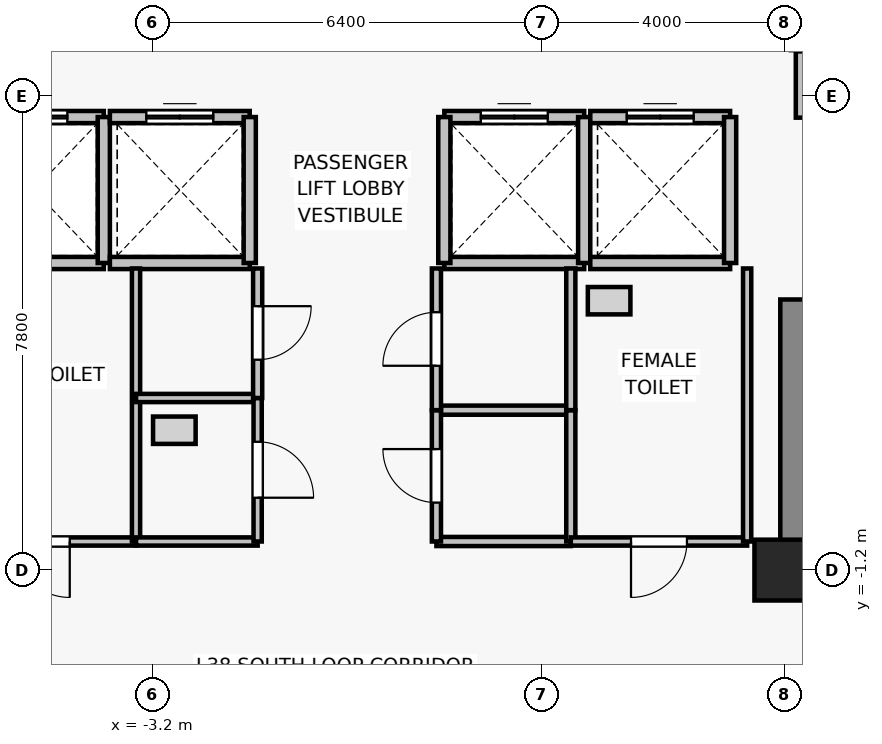
"""IFC4 building model, lengths in metres.
Left out: names, types, materials, properties, quantities, classifications, styles, units other than length and angle.
Written with IfcOpenShell. Run it as: python <this file> out.ifc"""

import sys

from ifc_helpers import new_model, si_unit, direction, frame, frame_2d, origin, origin_2d, place, context, subcontext, project, spatial, rectangle, extrude, source, transform, mapped, element, fill, save


model = new_model("IFC4")
c1 = context("Model", 3, precision=1e-05, world=origin(), true_north=direction((0.0, 1.0)))
c2 = subcontext(c1, "Body", "Model", "MODEL_VIEW")
j1 = project(units=[si_unit("LENGTHUNIT", "METRE"), si_unit("PLANEANGLEUNIT", "RADIAN")], contexts=[c1])
p1 = place(None, origin())
s1 = spatial("IfcSite", under=j1, at=p1, CompositionType="ELEMENT")
p2 = place(p1, origin())
s2 = spatial("IfcBuilding", under=s1, at=p2, CompositionType="ELEMENT")
p3 = place(p2, frame((0.0, 0.0, 136.3)))
s3 = spatial("IfcBuildingStorey", under=s2, at=p3, CompositionType="ELEMENT", Elevation=136.3)
p4 = place(p3, frame((7.2, -1.2, 0.0), z_axis=(0.0, 0.0, 1.0), x_axis=(1.0, 0.0, 0.0)))
e1 = element("IfcColumn", 1, at=p4, inside=s3, PredefinedType="COLUMN", context=c2, shape_type="SweptSolid", body=[
    extrude(rectangle(XDim=1.0, YDim=1.0, at=origin_2d()), origin(), (0.0, 0.0, 1.0), 3.3),
])
p5 = place(p3, frame((7.4, -0.825, 0.0), z_axis=(0.0, 0.0, 1.0), x_axis=(0.0, 1.0, 0.0)))
e2 = element("IfcWall", 2, at=p5, inside=s3, PredefinedType="SHEAR", context=c2, shape_type="SweptSolid", body=[
    extrude(rectangle(XDim=4.075, YDim=0.55, at=frame_2d((2.038, 0.0))), origin(), (0.0, 0.0, 1.0), 3.05),
])
p6 = place(p3, frame((-4.0, 3.85, 0.0), z_axis=(0.0, 0.0, 1.0), x_axis=(-1.0, 0.0, 0.0)))
e3 = element("IfcWall", 3, at=p6, inside=s3, PredefinedType="SOLIDWALL", context=c2, shape_type="SweptSolid", body=[
    extrude(rectangle(XDim=2.3, YDim=0.2, at=frame_2d((1.15, 0.0))), origin(), (0.0, 0.0, 1.0), 3.05),
])
p7 = place(p3, frame((-6.3, 6.25, 0.0), z_axis=(0.0, 0.0, 1.0), x_axis=(1.0, 0.0, 0.0)))
e4 = element("IfcWall", 4, at=p7, inside=s3, PredefinedType="SOLIDWALL", context=c2, shape_type="SweptSolid", body=[
    extrude(rectangle(XDim=2.3, YDim=0.2, at=frame_2d((1.15, 0.0))), origin(), (0.0, 0.0, 1.0), 3.05),
])
p8 = place(p7, frame((0.6, 0.0, 0.0)))
e5 = element("IfcOpeningElement", 5, at=p8, cuts=e4, PredefinedType="OPENING", context=c2, shape_type="SweptSolid", body=[
    extrude(rectangle(XDim=1.1, YDim=2.2, at=frame_2d((0.55, 1.1))), frame((0.0, 0.11, 0.0), z_axis=(0.0, -1.0, 0.0), x_axis=(1.0, 0.0, 0.0)), (0.0, 0.0, 1.0), 0.22),
])
p9 = place(p3, frame((-4.0, 6.25, 0.0), z_axis=(0.0, 0.0, 1.0), x_axis=(0.0, -1.0, 0.0)))
e6 = element("IfcWall", 6, at=p9, inside=s3, PredefinedType="SOLIDWALL", context=c2, shape_type="SweptSolid", body=[
    extrude(rectangle(XDim=2.4, YDim=0.2, at=frame_2d((1.2, 0.0))), origin(), (0.0, 0.0, 1.0), 3.05),
])
p10 = place(p3, frame((-1.6, 3.85, 0.0), z_axis=(0.0, 0.0, 1.0), x_axis=(-1.0, 0.0, 0.0)))
e7 = element("IfcWall", 7, at=p10, inside=s3, PredefinedType="SOLIDWALL", context=c2, shape_type="SweptSolid", body=[
    extrude(rectangle(XDim=2.3, YDim=0.2, at=frame_2d((1.15, 0.0))), origin(), (0.0, 0.0, 1.0), 3.05),
])
p11 = place(p3, frame((-3.9, 6.25, 0.0), z_axis=(0.0, 0.0, 1.0), x_axis=(1.0, 0.0, 0.0)))
e8 = element("IfcWall", 8, at=p11, inside=s3, PredefinedType="SOLIDWALL", context=c2, shape_type="SweptSolid", body=[
    extrude(rectangle(XDim=2.3, YDim=0.2, at=frame_2d((1.15, 0.0))), origin(), (0.0, 0.0, 1.0), 3.05),
])
p12 = place(p11, frame((0.6, 0.0, 0.0)))
e9 = element("IfcOpeningElement", 9, at=p12, cuts=e8, PredefinedType="OPENING", context=c2, shape_type="SweptSolid", body=[
    extrude(rectangle(XDim=1.1, YDim=2.2, at=frame_2d((0.55, 1.1))), frame((0.0, 0.11, 0.0), z_axis=(0.0, -1.0, 0.0), x_axis=(1.0, 0.0, 0.0)), (0.0, 0.0, 1.0), 0.22),
])
p13 = place(p3, frame((-1.6, 6.25, 0.0), z_axis=(0.0, 0.0, 1.0), x_axis=(0.0, -1.0, 0.0)))
e10 = element("IfcWall", 10, at=p13, inside=s3, PredefinedType="SOLIDWALL", context=c2, shape_type="SweptSolid", body=[
    extrude(rectangle(XDim=2.4, YDim=0.2, at=frame_2d((1.2, 0.0))), origin(), (0.0, 0.0, 1.0), 3.05),
])
p14 = place(p3, frame((3.9, 3.85, 0.0), z_axis=(0.0, 0.0, 1.0), x_axis=(-1.0, 0.0, 0.0)))
e11 = element("IfcWall", 11, at=p14, inside=s3, PredefinedType="SOLIDWALL", context=c2, shape_type="SweptSolid", body=[
    extrude(rectangle(XDim=2.3, YDim=0.2, at=frame_2d((1.15, 0.0))), origin(), (0.0, 0.0, 1.0), 3.05),
])
p15 = place(p3, frame((1.6, 6.25, 0.0), z_axis=(0.0, 0.0, 1.0), x_axis=(1.0, 0.0, 0.0)))
e12 = element("IfcWall", 12, at=p15, inside=s3, PredefinedType="SOLIDWALL", context=c2, shape_type="SweptSolid", body=[
    extrude(rectangle(XDim=2.3, YDim=0.2, at=frame_2d((1.15, 0.0))), origin(), (0.0, 0.0, 1.0), 3.05),
])
p16 = place(p15, frame((0.6, 0.0, 0.0)))
e13 = element("IfcOpeningElement", 13, at=p16, cuts=e12, PredefinedType="OPENING", context=c2, shape_type="SweptSolid", body=[
    extrude(rectangle(XDim=1.1, YDim=2.2, at=frame_2d((0.55, 1.1))), frame((0.0, 0.11, 0.0), z_axis=(0.0, -1.0, 0.0), x_axis=(1.0, 0.0, 0.0)), (0.0, 0.0, 1.0), 0.22),
])
for number, where, z_axis, x_axis in (
    (14, (1.6, 3.85, 0.0), (0.0, 0.0, 1.0), (0.0, 1.0, 0.0)),
    (15, (3.9, 6.25, 0.0), (0.0, 0.0, 1.0), (0.0, -1.0, 0.0)),
):
    element("IfcWall", number, at=place(p3, frame(where, z_axis=z_axis, x_axis=x_axis)), inside=s3, PredefinedType="SOLIDWALL", context=c2, shape_type="SweptSolid", body=[
        extrude(rectangle(XDim=2.4, YDim=0.2, at=frame_2d((1.2, 0.0))), origin(), (0.0, 0.0, 1.0), 3.05),
    ])
p17 = place(p3, frame((6.3, 3.85, 0.0), z_axis=(0.0, 0.0, 1.0), x_axis=(-1.0, 0.0, 0.0)))
e16 = element("IfcWall", 16, at=p17, inside=s3, PredefinedType="SOLIDWALL", context=c2, shape_type="SweptSolid", body=[
    extrude(rectangle(XDim=2.3, YDim=0.2, at=frame_2d((1.15, 0.0))), origin(), (0.0, 0.0, 1.0), 3.05),
])
p18 = place(p3, frame((4.0, 6.25, 0.0), z_axis=(0.0, 0.0, 1.0), x_axis=(1.0, 0.0, 0.0)))
e17 = element("IfcWall", 17, at=p18, inside=s3, PredefinedType="SOLIDWALL", context=c2, shape_type="SweptSolid", body=[
    extrude(rectangle(XDim=2.3, YDim=0.2, at=frame_2d((1.15, 0.0))), origin(), (0.0, 0.0, 1.0), 3.05),
])
p19 = place(p18, frame((0.6, 0.0, 0.0)))
e18 = element("IfcOpeningElement", 18, at=p19, cuts=e17, PredefinedType="OPENING", context=c2, shape_type="SweptSolid", body=[
    extrude(rectangle(XDim=1.1, YDim=2.2, at=frame_2d((0.55, 1.1))), frame((0.0, 0.11, 0.0), z_axis=(0.0, -1.0, 0.0), x_axis=(1.0, 0.0, 0.0)), (0.0, 0.0, 1.0), 0.22),
])
p20 = place(p3, frame((6.3, 6.25, 0.0), z_axis=(0.0, 0.0, 1.0), x_axis=(0.0, -1.0, 0.0)))
e19 = element("IfcWall", 19, at=p20, inside=s3, PredefinedType="SOLIDWALL", context=c2, shape_type="SweptSolid", body=[
    extrude(rectangle(XDim=2.4, YDim=0.2, at=frame_2d((1.2, 0.0))), origin(), (0.0, 0.0, 1.0), 3.05),
])
p21 = place(p3, frame((9.6, 7.35, 0.0), z_axis=(0.0, 0.0, 1.0), x_axis=(-1.0, 0.0, 0.0)))
e20 = element("IfcWall", 20, at=p21, inside=s3, PredefinedType="SOLIDWALL", context=c2, shape_type="SweptSolid", body=[
    extrude(rectangle(XDim=2.2, YDim=0.2, at=frame_2d((1.1, 0.0))), origin(), (0.0, 0.0, 1.0), 2.49),
])
p22 = place(p3, frame((7.47, 6.24, 0.0), z_axis=(0.0, 0.0, 1.0), x_axis=(0.0, 1.0, 0.0)))
e21 = element("IfcWall", 21, at=p22, inside=s3, PredefinedType="PARTITIONING", context=c2, shape_type="SweptSolid", body=[
    extrude(rectangle(XDim=1.09, YDim=0.18, at=frame_2d((0.545, 0.0))), origin(), (0.0, 0.0, 1.0), 2.49),
])
p23 = place(p3, frame((-3.47, -0.73, 0.0), z_axis=(0.0, 0.0, 1.0), x_axis=(-1.0, 0.0, 0.0)))
e22 = element("IfcWall", 22, at=p23, inside=s3, PredefinedType="PARTITIONING", context=c2, shape_type="SweptSolid", body=[
    extrude(rectangle(XDim=3.11, YDim=0.135, at=frame_2d((1.555, 0.0))), origin(), (0.0, 0.0, 1.0), 3.05),
])
p24 = place(p23, frame((1.09, 0.0, 0.0)))
e23 = element("IfcOpeningElement", 23, at=p24, cuts=e22, PredefinedType="OPENING", context=c2, shape_type="SweptSolid", body=[
    extrude(rectangle(XDim=0.92, YDim=2.1, at=frame_2d((0.46, 1.05))), frame((0.0, 0.077, 0.0), z_axis=(0.0, -1.0, 0.0), x_axis=(1.0, 0.0, 0.0)), (0.0, 0.0, 1.0), 0.155),
])
p25 = place(p3, frame((-3.47, 3.76, 0.0), z_axis=(0.0, 0.0, 1.0), x_axis=(0.0, -1.0, 0.0)))
e24 = element("IfcWall", 24, at=p25, inside=s3, PredefinedType="PARTITIONING", context=c2, shape_type="SweptSolid", body=[
    extrude(rectangle(XDim=4.49, YDim=0.135, at=frame_2d((2.245, 0.0))), origin(), (0.0, 0.0, 1.0), 3.05),
])
for number, where, z_axis, x_axis in (
    (25, (-1.47, -0.73, 0.0), (0.0, 0.0, 1.0), (-1.0, 0.0, 0.0)),
    (26, (-3.47, 1.63, 0.0), (0.0, 0.0, 1.0), (1.0, 0.0, 0.0)),
):
    element("IfcWall", number, at=place(p3, frame(where, z_axis=z_axis, x_axis=x_axis)), inside=s3, PredefinedType="PARTITIONING", context=c2, shape_type="SweptSolid", body=[
        extrude(rectangle(XDim=2.0, YDim=0.135, at=frame_2d((1.0, 0.0))), origin(), (0.0, 0.0, 1.0), 3.05),
    ])
p26 = place(p3, frame((-1.47, 1.63, 0.0), z_axis=(0.0, 0.0, 1.0), x_axis=(0.0, -1.0, 0.0)))
e27 = element("IfcWall", 27, at=p26, inside=s3, PredefinedType="PARTITIONING", context=c2, shape_type="SweptSolid", body=[
    extrude(rectangle(XDim=2.36, YDim=0.135, at=frame_2d((1.18, 0.0))), origin(), (0.0, 0.0, 1.0), 3.05),
])
p27 = place(p26, frame((0.72, 0.0, 0.0)))
e28 = element("IfcOpeningElement", 28, at=p27, cuts=e27, PredefinedType="OPENING", context=c2, shape_type="SweptSolid", body=[
    extrude(rectangle(XDim=0.92, YDim=2.1, at=frame_2d((0.46, 1.05))), frame((0.0, 0.077, 0.0), z_axis=(0.0, -1.0, 0.0), x_axis=(1.0, 0.0, 0.0)), (0.0, 0.0, 1.0), 0.155),
])
p28 = place(p3, frame((-1.47, 3.76, 0.0), z_axis=(0.0, 0.0, 1.0), x_axis=(0.0, -1.0, 0.0)))
e29 = element("IfcWall", 29, at=p28, inside=s3, PredefinedType="PARTITIONING", context=c2, shape_type="SweptSolid", body=[
    extrude(rectangle(XDim=2.13, YDim=0.15, at=frame_2d((1.065, 0.0))), origin(), (0.0, 0.0, 1.0), 3.05),
])
p29 = place(p28, frame((0.62, 0.0, 0.0)))
e30 = element("IfcOpeningElement", 30, at=p29, cuts=e29, PredefinedType="OPENING", context=c2, shape_type="SweptSolid", body=[
    extrude(rectangle(XDim=0.88, YDim=2.1, at=frame_2d((0.44, 1.05))), frame((0.0, 0.085, 0.0), z_axis=(0.0, -1.0, 0.0), x_axis=(1.0, 0.0, 0.0)), (0.0, 0.0, 1.0), 0.17),
])
for number, where, z_axis, x_axis in (
    (31, (3.68, -0.73, 0.0), (0.0, 0.0, 1.0), (-1.0, 0.0, 0.0)),
    (32, (1.47, 1.43, 0.0), (0.0, 0.0, 1.0), (1.0, 0.0, 0.0)),
):
    element("IfcWall", number, at=place(p3, frame(where, z_axis=z_axis, x_axis=x_axis)), inside=s3, PredefinedType="PARTITIONING", context=c2, shape_type="SweptSolid", body=[
        extrude(rectangle(XDim=2.21, YDim=0.15, at=frame_2d((1.105, 0.0))), origin(), (0.0, 0.0, 1.0), 3.05),
    ])
p30 = place(p3, frame((1.47, -0.73, 0.0), z_axis=(0.0, 0.0, 1.0), x_axis=(0.0, 1.0, 0.0)))
e33 = element("IfcWall", 33, at=p30, inside=s3, PredefinedType="PARTITIONING", context=c2, shape_type="SweptSolid", body=[
    extrude(rectangle(XDim=2.16, YDim=0.15, at=frame_2d((1.08, 0.0))), origin(), (0.0, 0.0, 1.0), 3.05),
])
p31 = place(p30, frame((0.64, 0.0, 0.0)))
e34 = element("IfcOpeningElement", 34, at=p31, cuts=e33, PredefinedType="OPENING", context=c2, shape_type="SweptSolid", body=[
    extrude(rectangle(XDim=0.88, YDim=2.1, at=frame_2d((0.44, 1.05))), frame((0.0, 0.085, 0.0), z_axis=(0.0, -1.0, 0.0), x_axis=(1.0, 0.0, 0.0)), (0.0, 0.0, 1.0), 0.17),
])
p32 = place(p3, frame((3.68, 1.43, 0.0), z_axis=(0.0, 0.0, 1.0), x_axis=(0.0, -1.0, 0.0)))
e35 = element("IfcWall", 35, at=p32, inside=s3, PredefinedType="PARTITIONING", context=c2, shape_type="SweptSolid", body=[
    extrude(rectangle(XDim=2.16, YDim=0.15, at=frame_2d((1.08, 0.0))), origin(), (0.0, 0.0, 1.0), 3.05),
])
p33 = place(p3, frame((1.47, 1.43, 0.0), z_axis=(0.0, 0.0, 1.0), x_axis=(0.0, 1.0, 0.0)))
e36 = element("IfcWall", 36, at=p33, inside=s3, PredefinedType="PARTITIONING", context=c2, shape_type="SweptSolid", body=[
    extrude(rectangle(XDim=2.33, YDim=0.15, at=frame_2d((1.165, 0.0))), origin(), (0.0, 0.0, 1.0), 3.05),
])
p34 = place(p33, frame((0.73, 0.0, 0.0)))
e37 = element("IfcOpeningElement", 37, at=p34, cuts=e36, PredefinedType="OPENING", context=c2, shape_type="SweptSolid", body=[
    extrude(rectangle(XDim=0.88, YDim=2.15, at=frame_2d((0.44, 1.075))), frame((0.0, 0.085, 0.0), z_axis=(0.0, -1.0, 0.0), x_axis=(1.0, 0.0, 0.0)), (0.0, 0.0, 1.0), 0.17),
])
p35 = place(p3, frame((3.68, 3.76, 0.0), z_axis=(0.0, 0.0, 1.0), x_axis=(0.0, -1.0, 0.0)))
e38 = element("IfcWall", 38, at=p35, inside=s3, PredefinedType="PARTITIONING", context=c2, shape_type="SweptSolid", body=[
    extrude(rectangle(XDim=2.33, YDim=0.15, at=frame_2d((1.165, 0.0))), origin(), (0.0, 0.0, 1.0), 3.05),
])
p36 = place(p3, frame((6.58, -0.73, 0.0), z_axis=(0.0, 0.0, 1.0), x_axis=(-1.0, 0.0, 0.0)))
e39 = element("IfcWall", 39, at=p36, inside=s3, PredefinedType="PARTITIONING", context=c2, shape_type="SweptSolid", body=[
    extrude(rectangle(XDim=2.9, YDim=0.135, at=frame_2d((1.45, 0.0))), origin(), (0.0, 0.0, 1.0), 3.05),
])
p37 = place(p36, frame((0.99, 0.0, 0.0)))
e40 = element("IfcOpeningElement", 40, at=p37, cuts=e39, PredefinedType="OPENING", context=c2, shape_type="SweptSolid", body=[
    extrude(rectangle(XDim=0.92, YDim=2.1, at=frame_2d((0.46, 1.05))), frame((0.0, 0.077, 0.0), z_axis=(0.0, -1.0, 0.0), x_axis=(1.0, 0.0, 0.0)), (0.0, 0.0, 1.0), 0.155),
])
p38 = place(p3, frame((6.58, 3.76, 0.0), z_axis=(0.0, 0.0, 1.0), x_axis=(0.0, -1.0, 0.0)))
e41 = element("IfcWall", 41, at=p38, inside=s3, PredefinedType="PARTITIONING", context=c2, shape_type="SweptSolid", body=[
    extrude(rectangle(XDim=4.49, YDim=0.135, at=frame_2d((2.245, 0.0))), origin(), (0.0, 0.0, 1.0), 3.05),
])
m1 = source(origin(), c2, "Body", "SweptSolid", [
    extrude(rectangle(XDim=1.1, YDim=2.2, at=frame_2d((0.55, 1.1))), frame((0.0, 0.025, 0.0), z_axis=(0.0, -1.0, 0.0), x_axis=(1.0, 0.0, 0.0)), (0.0, 0.0, 1.0), 0.05),
])
p39 = place(p8, origin())
e42 = element("IfcDoor", 42, at=p39, inside=s3, OperationType="DOUBLE_DOOR_SLIDING", PredefinedType="DOOR", context=c2, shape_type="MappedRepresentation", body=[
    mapped(m1, transform((0.0, 0.0, 0.0), x_axis=(1.0, 0.0, 0.0), y_axis=(0.0, 1.0, 0.0), z_axis=(0.0, 0.0, 1.0), scale=1.0)),
])
fill(e5, e42)
p40 = place(p12, origin())
e43 = element("IfcDoor", 43, at=p40, inside=s3, OperationType="DOUBLE_DOOR_SLIDING", PredefinedType="DOOR", context=c2, shape_type="MappedRepresentation", body=[
    mapped(m1, transform((0.0, 0.0, 0.0), x_axis=(1.0, 0.0, 0.0), y_axis=(0.0, 1.0, 0.0), z_axis=(0.0, 0.0, 1.0), scale=1.0)),
])
fill(e9, e43)
p41 = place(p16, origin())
e44 = element("IfcDoor", 44, at=p41, inside=s3, OperationType="DOUBLE_DOOR_SLIDING", PredefinedType="DOOR", context=c2, shape_type="MappedRepresentation", body=[
    mapped(m1, transform((0.0, 0.0, 0.0), x_axis=(1.0, 0.0, 0.0), y_axis=(0.0, 1.0, 0.0), z_axis=(0.0, 0.0, 1.0), scale=1.0)),
])
fill(e13, e44)
p42 = place(p19, origin())
e45 = element("IfcDoor", 45, at=p42, inside=s3, OperationType="DOUBLE_DOOR_SLIDING", PredefinedType="DOOR", context=c2, shape_type="MappedRepresentation", body=[
    mapped(m1, transform((0.0, 0.0, 0.0), x_axis=(1.0, 0.0, 0.0), y_axis=(0.0, 1.0, 0.0), z_axis=(0.0, 0.0, 1.0), scale=1.0)),
])
fill(e18, e45)
m2 = source(origin(), c2, "Body", "SweptSolid", [
    extrude(rectangle(XDim=0.92, YDim=2.1, at=frame_2d((0.46, 1.05))), frame((0.0, 0.025, 0.0), z_axis=(0.0, -1.0, 0.0), x_axis=(1.0, 0.0, 0.0)), (0.0, 0.0, 1.0), 0.05),
])
p43 = place(p24, origin())
e46 = element("IfcDoor", 46, at=p43, inside=s3, OperationType="SINGLE_SWING_LEFT", PredefinedType="DOOR", context=c2, shape_type="MappedRepresentation", body=[
    mapped(m2, transform((0.0, 0.0, 0.0), x_axis=(1.0, 0.0, 0.0), y_axis=(0.0, 1.0, 0.0), z_axis=(0.0, 0.0, 1.0), scale=1.0)),
])
fill(e23, e46)
p44 = place(p27, origin())
e47 = element("IfcDoor", 47, at=p44, inside=s3, OperationType="SINGLE_SWING_RIGHT", PredefinedType="DOOR", context=c2, shape_type="MappedRepresentation", body=[
    mapped(m2, transform((0.0, 0.0, 0.0), x_axis=(1.0, 0.0, 0.0), y_axis=(0.0, 1.0, 0.0), z_axis=(0.0, 0.0, 1.0), scale=1.0)),
])
fill(e28, e47)
m3 = source(origin(), c2, "Body", "SweptSolid", [
    extrude(rectangle(XDim=0.88, YDim=2.1, at=frame_2d((0.44, 1.05))), frame((0.0, 0.025, 0.0), z_axis=(0.0, -1.0, 0.0), x_axis=(1.0, 0.0, 0.0)), (0.0, 0.0, 1.0), 0.05),
])
p45 = place(p29, origin())
e48 = element("IfcDoor", 48, at=p45, inside=s3, OperationType="SINGLE_SWING_LEFT", PredefinedType="DOOR", context=c2, shape_type="MappedRepresentation", body=[
    mapped(m3, transform((0.0, 0.0, 0.0), x_axis=(1.0, 0.0, 0.0), y_axis=(0.0, 1.0, 0.0), z_axis=(0.0, 0.0, 1.0), scale=1.0)),
])
fill(e30, e48)
p46 = place(p31, origin())
e49 = element("IfcDoor", 49, at=p46, inside=s3, OperationType="SINGLE_SWING_RIGHT", PredefinedType="DOOR", context=c2, shape_type="MappedRepresentation", body=[
    mapped(m3, transform((0.0, 0.0, 0.0), x_axis=(1.0, 0.0, 0.0), y_axis=(0.0, 1.0, 0.0), z_axis=(0.0, 0.0, 1.0), scale=1.0)),
])
fill(e34, e49)
m4 = source(origin(), c2, "Body", "SweptSolid", [
    extrude(rectangle(XDim=0.88, YDim=2.15, at=frame_2d((0.44, 1.075))), frame((0.0, 0.025, 0.0), z_axis=(0.0, -1.0, 0.0), x_axis=(1.0, 0.0, 0.0)), (0.0, 0.0, 1.0), 0.05),
])
p47 = place(p34, origin())
e50 = element("IfcDoor", 50, at=p47, inside=s3, OperationType="SINGLE_SWING_LEFT", PredefinedType="DOOR", context=c2, shape_type="MappedRepresentation", body=[
    mapped(m4, transform((0.0, 0.0, 0.0), x_axis=(1.0, 0.0, 0.0), y_axis=(0.0, 1.0, 0.0), z_axis=(0.0, 0.0, 1.0), scale=1.0)),
])
fill(e37, e50)
p48 = place(p37, origin())
e51 = element("IfcDoor", 51, at=p48, inside=s3, OperationType="SINGLE_SWING_RIGHT", PredefinedType="DOOR", context=c2, shape_type="MappedRepresentation", body=[
    mapped(m2, transform((0.0, 0.0, 0.0), x_axis=(1.0, 0.0, 0.0), y_axis=(0.0, 1.0, 0.0), z_axis=(0.0, 0.0, 1.0), scale=1.0)),
])
fill(e40, e51)
save(model, sys.argv[1])
